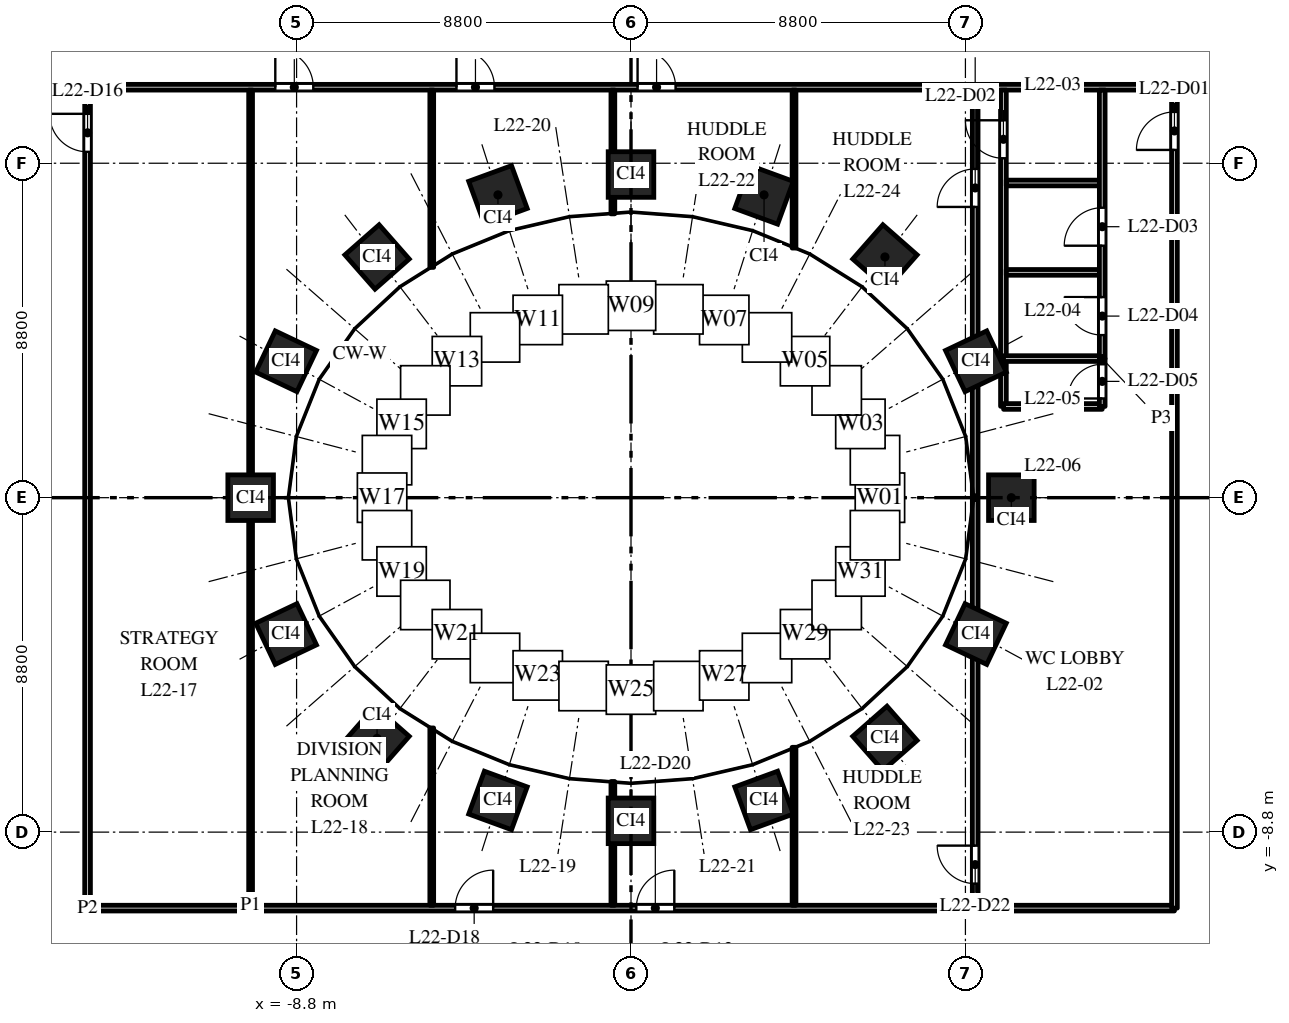
"""IFC4 building model, lengths in metres.
Left out: names, types, materials, properties, quantities, classifications, styles, units other than length and angle.
Written with IfcOpenShell. Run it as: python <this file> out.ifc"""

import sys

from ifc_helpers import new_model, si_unit, direction, frame, frame_2d, origin, origin_2d, place, context, subcontext, project, spatial, rectangle, extrude, element, fill, save


model = new_model("IFC4")
c1 = context("Model", 3, precision=1e-05, world=origin(), true_north=direction((0.0, 1.0)))
c2 = subcontext(c1, "Body", "Model", "MODEL_VIEW")
j1 = project(units=[si_unit("LENGTHUNIT", "METRE"), si_unit("PLANEANGLEUNIT", "RADIAN")], contexts=[c1])
p1 = place(None, origin())
s1 = spatial("IfcSite", under=j1, at=p1, CompositionType="ELEMENT")
p2 = place(p1, origin())
s2 = spatial("IfcBuilding", under=s1, at=p2, CompositionType="ELEMENT")
p3 = place(p2, frame((0.0, 0.0, 100.0)))
s3 = spatial("IfcBuildingStorey", under=s2, at=p3, CompositionType="ELEMENT", Elevation=100.0)
for number, where, z_axis, x_axis in (
    (1, (10.008, 0.0, 0.0), (0.0, 0.0, 1.0), (0.0, 1.0, 0.0)),
    (2, (9.076, 3.588, 0.0), (0.0, 0.0, 1.0), (-0.429, 0.903, 0.0)),
    (3, (6.682, 6.334, 0.0), (0.0, 0.0, 1.0), (-0.751, 0.66, 0.0)),
    (4, (3.501, 7.967, 0.0), (0.0, 0.0, 1.0), (-0.939, 0.344, 0.0)),
    (5, (0.0, 8.503, 0.0), (0.0, 0.0, 1.0), (-1.0, 0.0, 0.0)),
    (6, (-3.501, 7.967, 0.0), (0.0, 0.0, 1.0), (-0.939, -0.344, 0.0)),
    (7, (-6.682, 6.334, 0.0), (0.0, 0.0, 1.0), (-0.751, -0.66, 0.0)),
    (8, (-9.076, 3.588, 0.0), (0.0, 0.0, 1.0), (-0.429, -0.903, 0.0)),
    (9, (-10.008, 0.0, 0.0), (0.0, 0.0, 1.0), (0.0, -1.0, 0.0)),
    (10, (-9.076, -3.588, 0.0), (0.0, 0.0, 1.0), (0.429, -0.903, 0.0)),
    (11, (-6.682, -6.334, 0.0), (0.0, 0.0, 1.0), (0.751, -0.66, 0.0)),
    (12, (-3.501, -7.967, 0.0), (0.0, 0.0, 1.0), (0.939, -0.344, 0.0)),
    (13, (0.0, -8.503, 0.0), (0.0, 0.0, 1.0), (1.0, 0.0, 0.0)),
    (14, (3.501, -7.967, 0.0), (0.0, 0.0, 1.0), (0.939, 0.344, 0.0)),
    (15, (6.682, -6.334, 0.0), (0.0, 0.0, 1.0), (0.751, 0.66, 0.0)),
    (16, (9.076, -3.588, 0.0), (0.0, 0.0, 1.0), (0.429, 0.903, 0.0)),
):
    element("IfcColumn", number, at=place(p3, frame(where, z_axis=z_axis, x_axis=x_axis)), inside=s3, PredefinedType="COLUMN", context=c2, shape_type="SweptSolid", body=[
        extrude(rectangle(XDim=1.2, YDim=1.2, at=origin_2d()), origin(), (0.0, 0.0, 1.0), 4.0),
    ])
p4 = place(p3, frame((-14.3, -10.8, 0.0), z_axis=(0.0, 0.0, 1.0), x_axis=(0.0, 1.0, 0.0)))
e17 = element("IfcWall", 17, at=p4, inside=s3, PredefinedType="PARTITIONING", context=c2, shape_type="SweptSolid", body=[
    extrude(rectangle(XDim=21.6, YDim=0.15, at=frame_2d((10.8, 0.0))), origin(), (0.0, 0.0, 1.0), 2.75),
])
p5 = place(p4, frame((19.9, 0.0, 0.0)))
e18 = element("IfcOpeningElement", 18, at=p5, cuts=e17, PredefinedType="OPENING", context=c2, shape_type="SweptSolid", body=[
    extrude(rectangle(XDim=1.0, YDim=2.1, at=frame_2d((0.5, 1.05))), frame((0.0, 0.085, 0.0), z_axis=(0.0, -1.0, 0.0), x_axis=(1.0, 0.0, 0.0)), (0.0, 0.0, 1.0), 0.17),
])
p6 = place(p3, frame((-14.3, -10.8, 0.0), z_axis=(0.0, 0.0, 1.0), x_axis=(1.0, 0.0, 0.0)))
e19 = element("IfcWall", 19, at=p6, inside=s3, PredefinedType="PARTITIONING", context=c2, shape_type="SweptSolid", body=[
    extrude(rectangle(XDim=28.6, YDim=0.15, at=frame_2d((14.3, 0.0))), origin(), (0.0, 0.0, 1.0), 2.85),
])
p7 = place(p6, frame((9.673, 0.0, 0.0)))
e20 = element("IfcOpeningElement", 20, at=p7, cuts=e19, PredefinedType="OPENING", context=c2, shape_type="SweptSolid", body=[
    extrude(rectangle(XDim=1.0, YDim=2.1, at=frame_2d((0.5, 1.05))), frame((0.0, 0.085, 0.0), z_axis=(0.0, -1.0, 0.0), x_axis=(1.0, 0.0, 0.0)), (0.0, 0.0, 1.0), 0.17),
])
p8 = place(p6, frame((14.44, 0.0, 0.0)))
e21 = element("IfcOpeningElement", 21, at=p8, cuts=e19, PredefinedType="OPENING", context=c2, shape_type="SweptSolid", body=[
    extrude(rectangle(XDim=1.0, YDim=2.1, at=frame_2d((0.5, 1.05))), frame((0.0, 0.085, 0.0), z_axis=(0.0, -1.0, 0.0), x_axis=(1.0, 0.0, 0.0)), (0.0, 0.0, 1.0), 0.17),
])
p9 = place(p3, frame((-14.3, 10.8, 0.0), z_axis=(0.0, 0.0, 1.0), x_axis=(1.0, 0.0, 0.0)))
e22 = element("IfcWall", 22, at=p9, inside=s3, PredefinedType="PARTITIONING", context=c2, shape_type="SweptSolid", body=[
    extrude(rectangle(XDim=28.6, YDim=0.15, at=frame_2d((14.3, 0.0))), origin(), (0.0, 0.0, 1.0), 2.85),
])
p10 = place(p9, frame((4.94, 0.0, 0.0)))
e23 = element("IfcOpeningElement", 23, at=p10, cuts=e22, PredefinedType="OPENING", context=c2, shape_type="SweptSolid", body=[
    extrude(rectangle(XDim=1.0, YDim=2.1, at=frame_2d((0.5, 1.05))), frame((0.0, 0.085, 0.0), z_axis=(0.0, -1.0, 0.0), x_axis=(1.0, 0.0, 0.0)), (0.0, 0.0, 1.0), 0.17),
])
p11 = place(p9, frame((9.707, 0.0, 0.0)))
e24 = element("IfcOpeningElement", 24, at=p11, cuts=e22, PredefinedType="OPENING", context=c2, shape_type="SweptSolid", body=[
    extrude(rectangle(XDim=1.0, YDim=2.1, at=frame_2d((0.5, 1.05))), frame((0.0, 0.085, 0.0), z_axis=(0.0, -1.0, 0.0), x_axis=(1.0, 0.0, 0.0)), (0.0, 0.0, 1.0), 0.17),
])
p12 = place(p9, frame((14.473, 0.0, 0.0)))
e25 = element("IfcOpeningElement", 25, at=p12, cuts=e22, PredefinedType="OPENING", context=c2, shape_type="SweptSolid", body=[
    extrude(rectangle(XDim=1.0, YDim=2.1, at=frame_2d((0.5, 1.05))), frame((0.0, 0.085, 0.0), z_axis=(0.0, -1.0, 0.0), x_axis=(1.0, 0.0, 0.0)), (0.0, 0.0, 1.0), 0.17),
])
p13 = place(p3, frame((-10.01, -10.725, 0.0), z_axis=(0.0, 0.0, 1.0), x_axis=(0.0, 1.0, 0.0)))
e26 = element("IfcWall", 26, at=p13, inside=s3, PredefinedType="PARTITIONING", context=c2, shape_type="SweptSolid", body=[
    extrude(rectangle(XDim=21.45, YDim=0.1, at=frame_2d((10.725, 0.0))), origin(), (0.0, 0.0, 1.0), 2.75),
])
for number, where, z_axis, x_axis in (
    (27, (-5.243, -10.725, 0.0), (0.0, 0.0, 1.0), (0.0, 1.0, 0.0)),
    (28, (-5.243, 6.059, 0.0), (0.0, 0.0, 1.0), (0.0, 1.0, 0.0)),
):
    element("IfcWall", number, at=place(p3, frame(where, z_axis=z_axis, x_axis=x_axis)), inside=s3, PredefinedType="PARTITIONING", context=c2, shape_type="SweptSolid", body=[
        extrude(rectangle(XDim=4.666, YDim=0.1, at=frame_2d((2.333, 0.0))), origin(), (0.0, 0.0, 1.0), 2.9),
    ])
for number, where, z_axis, x_axis in (
    (29, (-0.477, -10.725, 0.0), (0.0, 0.0, 1.0), (0.0, 1.0, 0.0)),
    (30, (-0.477, 7.468, 0.0), (0.0, 0.0, 1.0), (0.0, 1.0, 0.0)),
):
    element("IfcWall", number, at=place(p3, frame(where, z_axis=z_axis, x_axis=x_axis)), inside=s3, PredefinedType="PARTITIONING", context=c2, shape_type="SweptSolid", body=[
        extrude(rectangle(XDim=3.257, YDim=0.1, at=frame_2d((1.628, 0.0))), origin(), (0.0, 0.0, 1.0), 2.9),
    ])
for number, where, z_axis, x_axis in (
    (31, (4.29, -10.725, 0.0), (0.0, 0.0, 1.0), (0.0, 1.0, 0.0)),
    (32, (4.29, 6.568, 0.0), (0.0, 0.0, 1.0), (0.0, 1.0, 0.0)),
):
    element("IfcWall", number, at=place(p3, frame(where, z_axis=z_axis, x_axis=x_axis)), inside=s3, PredefinedType="PARTITIONING", context=c2, shape_type="SweptSolid", body=[
        extrude(rectangle(XDim=4.157, YDim=0.1, at=frame_2d((2.079, 0.0))), origin(), (0.0, 0.0, 1.0), 2.9),
    ])
p14 = place(p3, frame((9.057, -10.725, 0.0), z_axis=(0.0, 0.0, 1.0), x_axis=(0.0, 1.0, 0.0)))
e33 = element("IfcWall", 33, at=p14, inside=s3, PredefinedType="PARTITIONING", context=c2, shape_type="SweptSolid", body=[
    extrude(rectangle(XDim=10.68, YDim=0.15, at=frame_2d((5.34, 0.0))), origin(), (0.0, 0.0, 1.0), 2.75),
])
p15 = place(p14, frame((0.57, 0.0, 0.0)))
e34 = element("IfcOpeningElement", 34, at=p15, cuts=e33, PredefinedType="OPENING", context=c2, shape_type="SweptSolid", body=[
    extrude(rectangle(XDim=1.0, YDim=2.1, at=frame_2d((0.5, 1.05))), frame((0.0, 0.085, 0.0), z_axis=(0.0, -1.0, 0.0), x_axis=(1.0, 0.0, 0.0)), (0.0, 0.0, 1.0), 0.17),
])
p16 = place(p3, frame((9.057, 0.045, 0.0), z_axis=(0.0, 0.0, 1.0), x_axis=(0.0, 1.0, 0.0)))
e35 = element("IfcWall", 35, at=p16, inside=s3, PredefinedType="PARTITIONING", context=c2, shape_type="SweptSolid", body=[
    extrude(rectangle(XDim=10.68, YDim=0.15, at=frame_2d((5.34, 0.0))), origin(), (0.0, 0.0, 1.0), 2.75),
])
p17 = place(p16, frame((7.605, 0.0, 0.0)))
e36 = element("IfcOpeningElement", 36, at=p17, cuts=e35, PredefinedType="OPENING", context=c2, shape_type="SweptSolid", body=[
    extrude(rectangle(XDim=1.0, YDim=2.1, at=frame_2d((0.5, 1.05))), frame((0.0, 0.085, 0.0), z_axis=(0.0, -1.0, 0.0), x_axis=(1.0, 0.0, 0.0)), (0.0, 0.0, 1.0), 0.17),
])
p18 = place(p3, frame((9.8, 2.404, 0.0), z_axis=(0.0, 0.0, 1.0), x_axis=(0.0, 1.0, 0.0)))
e37 = element("IfcWall", 37, at=p18, inside=s3, PredefinedType="PARTITIONING", context=c2, shape_type="SweptSolid", body=[
    extrude(rectangle(XDim=1.256, YDim=0.15, at=frame_2d((0.628, 0.0))), origin(), (0.0, 0.0, 1.0), 3.7),
])
p19 = place(p3, frame((9.8, 3.66, 0.0), z_axis=(0.0, 0.0, 1.0), x_axis=(0.0, 1.0, 0.0)))
e38 = element("IfcWall", 38, at=p19, inside=s3, PredefinedType="PARTITIONING", context=c2, shape_type="SweptSolid", body=[
    extrude(rectangle(XDim=7.065, YDim=0.15, at=frame_2d((3.533, 0.0))), origin(), (0.0, 0.0, 1.0), 2.75),
])
p20 = place(p19, frame((5.27, 0.0, 0.0)))
e39 = element("IfcOpeningElement", 39, at=p20, cuts=e38, PredefinedType="OPENING", context=c2, shape_type="SweptSolid", body=[
    extrude(rectangle(XDim=1.0, YDim=2.1, at=frame_2d((0.5, 1.05))), frame((0.0, 0.085, 0.0), z_axis=(0.0, -1.0, 0.0), x_axis=(1.0, 0.0, 0.0)), (0.0, 0.0, 1.0), 0.17),
])
p21 = place(p3, frame((9.8, 3.66, 0.0), z_axis=(0.0, 0.0, 1.0), x_axis=(1.0, 0.0, 0.0)))
e40 = element("IfcWall", 40, at=p21, inside=s3, PredefinedType="PARTITIONING", context=c2, shape_type="SweptSolid", body=[
    extrude(rectangle(XDim=2.6, YDim=0.15, at=frame_2d((1.3, 0.0))), origin(), (0.0, 0.0, 1.0), 3.7),
])
p22 = place(p3, frame((9.875, 5.928, 0.0), z_axis=(0.0, 0.0, 1.0), x_axis=(1.0, 0.0, 0.0)))
e41 = element("IfcWall", 41, at=p22, inside=s3, PredefinedType="PARTITIONING", context=c2, shape_type="SweptSolid", body=[
    extrude(rectangle(XDim=2.45, YDim=0.15, at=frame_2d((1.225, 0.0))), origin(), (0.0, 0.0, 1.0), 2.75),
])
p23 = place(p3, frame((9.875, 8.28, 0.0), z_axis=(0.0, 0.0, 1.0), x_axis=(1.0, 0.0, 0.0)))
e42 = element("IfcWall", 42, at=p23, inside=s3, PredefinedType="PARTITIONING", context=c2, shape_type="SweptSolid", body=[
    extrude(rectangle(XDim=2.45, YDim=0.15, at=frame_2d((1.225, 0.0))), origin(), (0.0, 0.0, 1.0), 3.7),
])
p24 = place(p3, frame((9.804, 2.4, 0.0), z_axis=(0.0, 0.0, 1.0), x_axis=(1.0, 0.0, 0.0)))
e43 = element("IfcWall", 43, at=p24, inside=s3, PredefinedType="PARTITIONING", context=c2, shape_type="SweptSolid", body=[
    extrude(rectangle(XDim=2.596, YDim=0.15, at=frame_2d((1.298, 0.0))), origin(), (0.0, 0.0, 1.0), 3.7),
])
p25 = place(p3, frame((12.4, 2.4, 0.0), z_axis=(0.0, 0.0, 1.0), x_axis=(0.0, 1.0, 0.0)))
e44 = element("IfcWall", 44, at=p25, inside=s3, PredefinedType="PARTITIONING", context=c2, shape_type="SweptSolid", body=[
    extrude(rectangle(XDim=1.26, YDim=0.15, at=frame_2d((0.63, 0.0))), origin(), (0.0, 0.0, 1.0), 3.7),
])
p26 = place(p25, frame((0.21, 0.0, 0.0)))
e45 = element("IfcOpeningElement", 45, at=p26, cuts=e44, PredefinedType="OPENING", context=c2, shape_type="SweptSolid", body=[
    extrude(rectangle(XDim=0.9, YDim=2.1, at=frame_2d((0.45, 1.05))), frame((0.0, 0.085, 0.0), z_axis=(0.0, -1.0, 0.0), x_axis=(1.0, 0.0, 0.0)), (0.0, 0.0, 1.0), 0.17),
])
p27 = place(p3, frame((12.4, 3.66, 0.0), z_axis=(0.0, 0.0, 1.0), x_axis=(0.0, 1.0, 0.0)))
e46 = element("IfcWall", 46, at=p27, inside=s3, PredefinedType="PARTITIONING", context=c2, shape_type="SweptSolid", body=[
    extrude(rectangle(XDim=7.065, YDim=0.15, at=frame_2d((3.533, 0.0))), origin(), (0.0, 0.0, 1.0), 2.75),
])
p28 = place(p27, frame((2.97, 0.0, 0.0)))
e47 = element("IfcOpeningElement", 47, at=p28, cuts=e46, PredefinedType="OPENING", context=c2, shape_type="SweptSolid", body=[
    extrude(rectangle(XDim=1.0, YDim=2.1, at=frame_2d((0.5, 1.05))), frame((0.0, 0.085, 0.0), z_axis=(0.0, -1.0, 0.0), x_axis=(1.0, 0.0, 0.0)), (0.0, 0.0, 1.0), 0.17),
])
p29 = place(p27, frame((0.618, 0.0, 0.0)))
e48 = element("IfcOpeningElement", 48, at=p29, cuts=e46, PredefinedType="OPENING", context=c2, shape_type="SweptSolid", body=[
    extrude(rectangle(XDim=1.0, YDim=2.1, at=frame_2d((0.5, 1.05))), frame((0.0, 0.085, 0.0), z_axis=(0.0, -1.0, 0.0), x_axis=(1.0, 0.0, 0.0)), (0.0, 0.0, 1.0), 0.17),
])
p30 = place(p3, frame((14.3, -10.8, 0.0), z_axis=(0.0, 0.0, 1.0), x_axis=(0.0, 1.0, 0.0)))
e49 = element("IfcWall", 49, at=p30, inside=s3, PredefinedType="PARTITIONING", context=c2, shape_type="SweptSolid", body=[
    extrude(rectangle(XDim=21.6, YDim=0.15, at=frame_2d((10.8, 0.0))), origin(), (0.0, 0.0, 1.0), 2.75),
])
p31 = place(p30, frame((19.95, 0.0, 0.0)))
e50 = element("IfcOpeningElement", 50, at=p31, cuts=e49, PredefinedType="OPENING", context=c2, shape_type="SweptSolid", body=[
    extrude(rectangle(XDim=1.0, YDim=2.1, at=frame_2d((0.5, 1.05))), frame((0.0, 0.085, 0.0), z_axis=(0.0, -1.0, 0.0), x_axis=(1.0, 0.0, 0.0)), (0.0, 0.0, 1.0), 0.17),
])
p32 = place(p31, origin())
e51 = element("IfcDoor", 51, at=p32, inside=s3, OperationType="SINGLE_SWING_LEFT", PredefinedType="DOOR", context=c2, shape_type="SweptSolid", body=[
    extrude(rectangle(XDim=1.0, YDim=2.1, at=frame_2d((0.5, 1.05))), frame((0.0, 0.025, 0.0), z_axis=(0.0, -1.0, 0.0), x_axis=(1.0, 0.0, 0.0)), (0.0, 0.0, 1.0), 0.05),
])
fill(e50, e51)
p33 = place(p20, origin())
e52 = element("IfcDoor", 52, at=p33, inside=s3, OperationType="SINGLE_SWING_RIGHT", PredefinedType="DOOR", context=c2, shape_type="SweptSolid", body=[
    extrude(rectangle(XDim=1.0, YDim=2.1, at=frame_2d((0.5, 1.05))), frame((0.0, 0.025, 0.0), z_axis=(0.0, -1.0, 0.0), x_axis=(1.0, 0.0, 0.0)), (0.0, 0.0, 1.0), 0.05),
])
fill(e39, e52)
p34 = place(p28, origin())
e53 = element("IfcDoor", 53, at=p34, inside=s3, OperationType="SINGLE_SWING_LEFT", PredefinedType="DOOR", context=c2, shape_type="SweptSolid", body=[
    extrude(rectangle(XDim=1.0, YDim=2.1, at=frame_2d((0.5, 1.05))), frame((0.0, 0.025, 0.0), z_axis=(0.0, -1.0, 0.0), x_axis=(1.0, 0.0, 0.0)), (0.0, 0.0, 1.0), 0.05),
])
fill(e47, e53)
p35 = place(p29, origin())
e54 = element("IfcDoor", 54, at=p35, inside=s3, OperationType="SINGLE_SWING_RIGHT", PredefinedType="DOOR", context=c2, shape_type="SweptSolid", body=[
    extrude(rectangle(XDim=1.0, YDim=2.1, at=frame_2d((0.5, 1.05))), frame((0.0, 0.025, 0.0), z_axis=(0.0, -1.0, 0.0), x_axis=(1.0, 0.0, 0.0)), (0.0, 0.0, 1.0), 0.05),
])
fill(e48, e54)
p36 = place(p26, origin())
e55 = element("IfcDoor", 55, at=p36, inside=s3, OperationType="SINGLE_SWING_LEFT", PredefinedType="DOOR", context=c2, shape_type="SweptSolid", body=[
    extrude(rectangle(XDim=0.9, YDim=2.1, at=frame_2d((0.45, 1.05))), frame((0.0, 0.025, 0.0), z_axis=(0.0, -1.0, 0.0), x_axis=(1.0, 0.0, 0.0)), (0.0, 0.0, 1.0), 0.05),
])
fill(e45, e55)
p37 = place(p5, origin())
e56 = element("IfcDoor", 56, at=p37, inside=s3, OperationType="SINGLE_SWING_RIGHT", PredefinedType="DOOR", context=c2, shape_type="SweptSolid", body=[
    extrude(rectangle(XDim=1.0, YDim=2.1, at=frame_2d((0.5, 1.05))), frame((0.0, 0.025, 0.0), z_axis=(0.0, -1.0, 0.0), x_axis=(1.0, 0.0, 0.0)), (0.0, 0.0, 1.0), 0.05),
])
fill(e18, e56)
p38 = place(p10, origin())
e57 = element("IfcDoor", 57, at=p38, inside=s3, OperationType="SINGLE_SWING_LEFT", PredefinedType="DOOR", context=c2, shape_type="SweptSolid", body=[
    extrude(rectangle(XDim=1.0, YDim=2.1, at=frame_2d((0.5, 1.05))), frame((0.0, 0.025, 0.0), z_axis=(0.0, -1.0, 0.0), x_axis=(1.0, 0.0, 0.0)), (0.0, 0.0, 1.0), 0.05),
])
fill(e23, e57)
p39 = place(p7, origin())
e58 = element("IfcDoor", 58, at=p39, inside=s3, OperationType="SINGLE_SWING_RIGHT", PredefinedType="DOOR", context=c2, shape_type="SweptSolid", body=[
    extrude(rectangle(XDim=1.0, YDim=2.1, at=frame_2d((0.5, 1.05))), frame((0.0, 0.025, 0.0), z_axis=(0.0, -1.0, 0.0), x_axis=(1.0, 0.0, 0.0)), (0.0, 0.0, 1.0), 0.05),
])
fill(e20, e58)
p40 = place(p11, origin())
e59 = element("IfcDoor", 59, at=p40, inside=s3, OperationType="SINGLE_SWING_LEFT", PredefinedType="DOOR", context=c2, shape_type="SweptSolid", body=[
    extrude(rectangle(XDim=1.0, YDim=2.1, at=frame_2d((0.5, 1.05))), frame((0.0, 0.025, 0.0), z_axis=(0.0, -1.0, 0.0), x_axis=(1.0, 0.0, 0.0)), (0.0, 0.0, 1.0), 0.05),
])
fill(e24, e59)
p41 = place(p8, origin())
e60 = element("IfcDoor", 60, at=p41, inside=s3, OperationType="SINGLE_SWING_RIGHT", PredefinedType="DOOR", context=c2, shape_type="SweptSolid", body=[
    extrude(rectangle(XDim=1.0, YDim=2.1, at=frame_2d((0.5, 1.05))), frame((0.0, 0.025, 0.0), z_axis=(0.0, -1.0, 0.0), x_axis=(1.0, 0.0, 0.0)), (0.0, 0.0, 1.0), 0.05),
])
fill(e21, e60)
p42 = place(p12, origin())
e61 = element("IfcDoor", 61, at=p42, inside=s3, OperationType="SINGLE_SWING_LEFT", PredefinedType="DOOR", context=c2, shape_type="SweptSolid", body=[
    extrude(rectangle(XDim=1.0, YDim=2.1, at=frame_2d((0.5, 1.05))), frame((0.0, 0.025, 0.0), z_axis=(0.0, -1.0, 0.0), x_axis=(1.0, 0.0, 0.0)), (0.0, 0.0, 1.0), 0.05),
])
fill(e25, e61)
p43 = place(p15, origin())
e62 = element("IfcDoor", 62, at=p43, inside=s3, OperationType="SINGLE_SWING_RIGHT", PredefinedType="DOOR", context=c2, shape_type="SweptSolid", body=[
    extrude(rectangle(XDim=1.0, YDim=2.1, at=frame_2d((0.5, 1.05))), frame((0.0, 0.025, 0.0), z_axis=(0.0, -1.0, 0.0), x_axis=(1.0, 0.0, 0.0)), (0.0, 0.0, 1.0), 0.05),
])
fill(e34, e62)
p44 = place(p17, origin())
e63 = element("IfcDoor", 63, at=p44, inside=s3, OperationType="SINGLE_SWING_LEFT", PredefinedType="DOOR", context=c2, shape_type="SweptSolid", body=[
    extrude(rectangle(XDim=1.0, YDim=2.1, at=frame_2d((0.5, 1.05))), frame((0.0, 0.025, 0.0), z_axis=(0.0, -1.0, 0.0), x_axis=(1.0, 0.0, 0.0)), (0.0, 0.0, 1.0), 0.05),
])
fill(e36, e63)
save(model, sys.argv[1])
